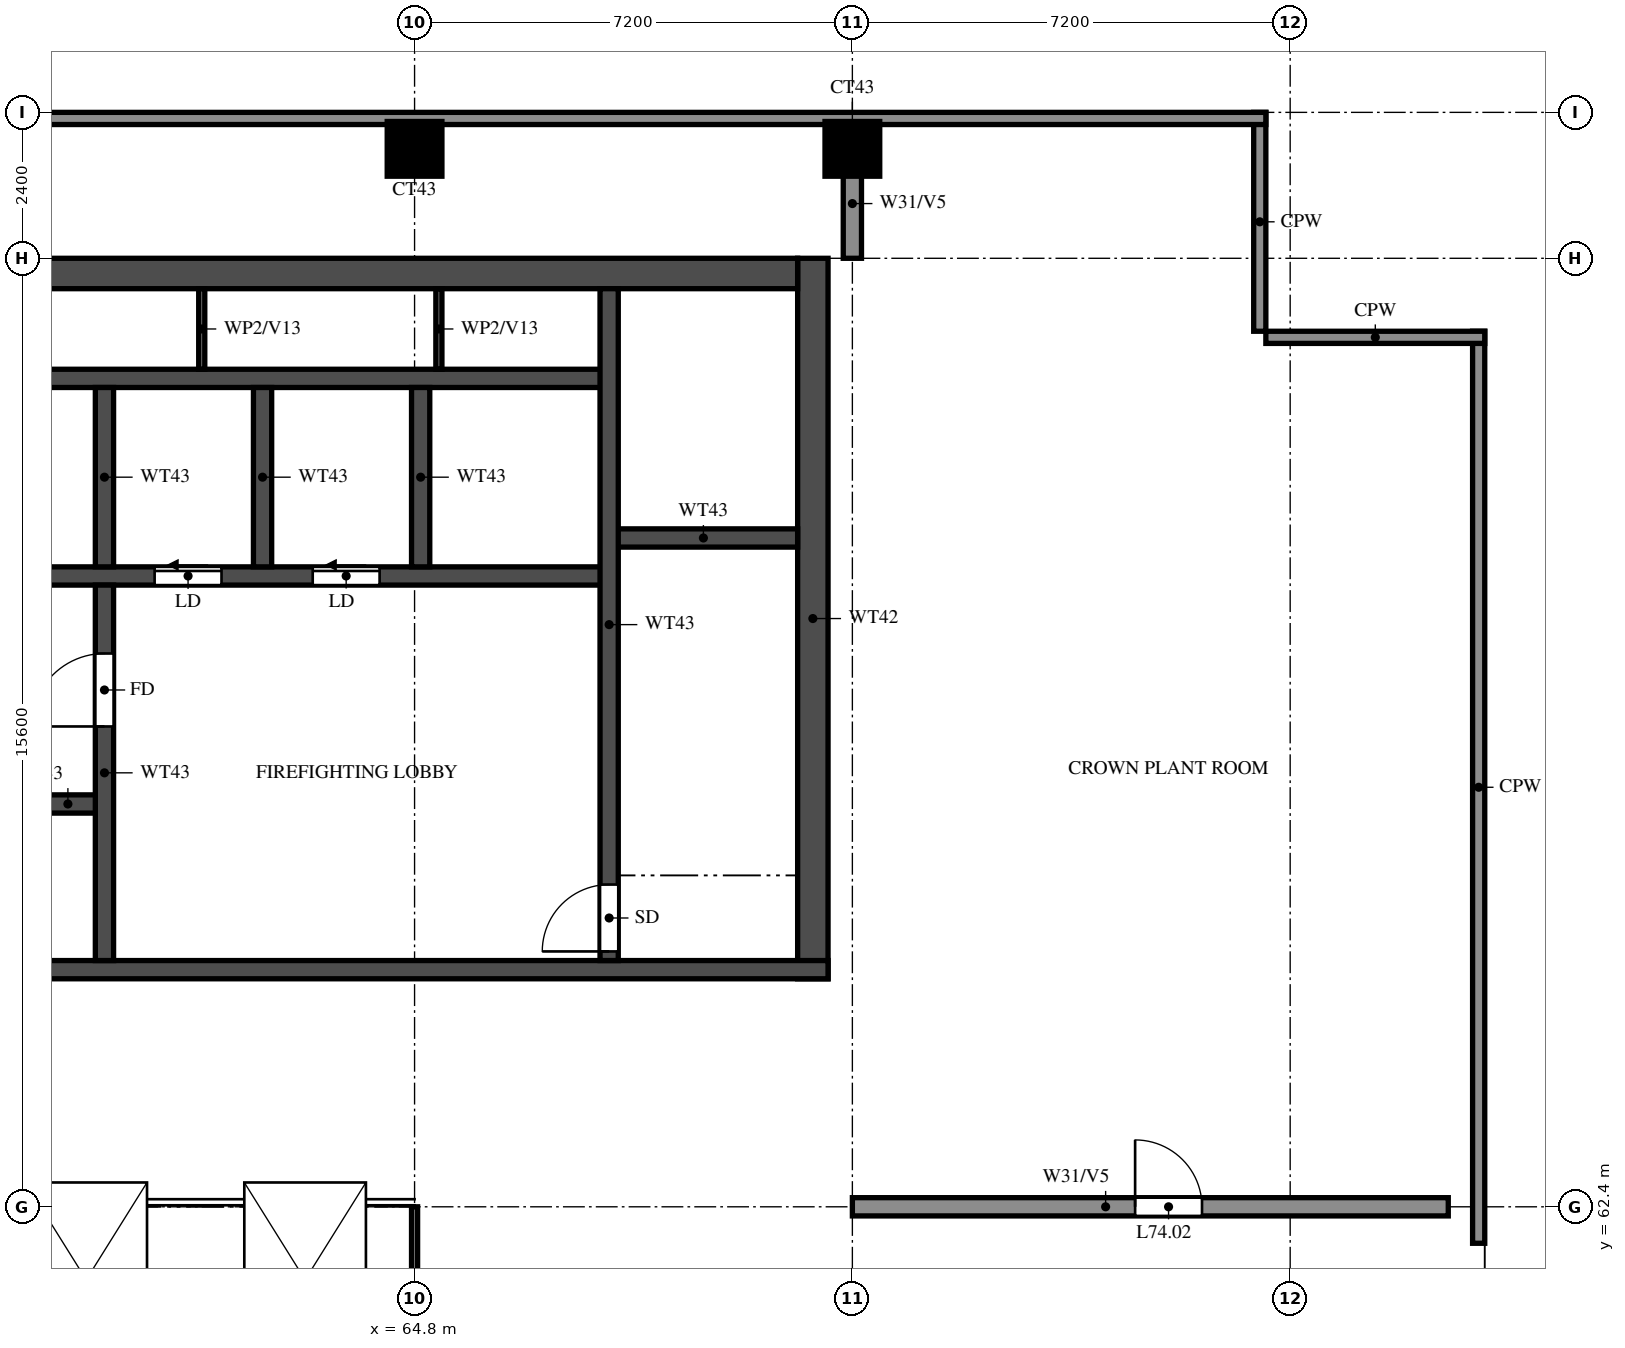
"""IFC4 building model, lengths in metres.
Left out: names, types, materials, properties, quantities, classifications, styles, units other than length and angle.
Written with IfcOpenShell. Run it as: python <this file> out.ifc"""

import sys

from ifc_helpers import new_model, si_unit, direction, frame, frame_2d, origin, origin_2d, place, context, subcontext, project, spatial, rectangle, extrude, source, transform, mapped, element, fill, save


model = new_model("IFC4")
c1 = context("Model", 3, precision=1e-05, world=origin(), true_north=direction((0.0, 1.0)))
c2 = subcontext(c1, "Body", "Model", "MODEL_VIEW")
j1 = project(units=[si_unit("LENGTHUNIT", "METRE"), si_unit("PLANEANGLEUNIT", "RADIAN")], contexts=[c1])
p1 = place(None, origin())
s1 = spatial("IfcSite", under=j1, at=p1, CompositionType="ELEMENT")
p2 = place(p1, origin())
s2 = spatial("IfcBuilding", under=s1, at=p2, CompositionType="ELEMENT")
p3 = place(p2, frame((0.0, 0.0, 274.5)))
s3 = spatial("IfcBuildingStorey", under=s2, at=p3, CompositionType="ELEMENT", Elevation=274.5)
m1 = source(origin(), c2, "Body", "SweptSolid", [
    extrude(rectangle(XDim=0.9, YDim=0.9, at=origin_2d()), origin(), (0.0, 0.0, 1.0), 7.0),
])
for number, where, z_axis, x_axis in (
    (1, (64.8, 79.8, 0.0), (0.0, 0.0, 1.0), (1.0, 0.0, 0.0)),
    (2, (72.0, 79.8, 0.0), (0.0, 0.0, 1.0), (1.0, 0.0, 0.0)),
):
    element("IfcColumn", number, at=place(p3, frame(where, z_axis=z_axis, x_axis=x_axis)), inside=s3, PredefinedType="COLUMN", context=c2, shape_type="MappedRepresentation", body=[
        mapped(m1, transform((0.0, 0.0, 0.0))),
    ])
p4 = place(p3, frame((71.35, 66.15, 0.0), z_axis=(0.0, 0.0, 1.0), x_axis=(0.0, 1.0, 0.0)))
e3 = element("IfcWall", 3, at=p4, inside=s3, PredefinedType="SHEAR", context=c2, shape_type="SweptSolid", body=[
    extrude(rectangle(XDim=11.85, YDim=0.5, at=frame_2d((5.925, 0.0))), origin(), (0.0, 0.0, 1.0), 7.0),
])
p5 = place(p3, frame((29.7, 77.75, 0.0), z_axis=(0.0, 0.0, 1.0), x_axis=(1.0, 0.0, 0.0)))
e4 = element("IfcWall", 4, at=p5, inside=s3, PredefinedType="SHEAR", context=c2, shape_type="SweptSolid", body=[
    extrude(rectangle(XDim=41.4, YDim=0.5, at=frame_2d((20.7, 0.0))), origin(), (0.0, 0.0, 1.0), 7.0),
])
p6 = place(p3, frame((29.2, 66.3, 0.0), z_axis=(0.0, 0.0, 1.0), x_axis=(1.0, 0.0, 0.0)))
e5 = element("IfcWall", 5, at=p6, inside=s3, PredefinedType="SHEAR", context=c2, shape_type="SweptSolid", body=[
    extrude(rectangle(XDim=42.4, YDim=0.3, at=frame_2d((21.2, 0.0))), origin(), (0.0, 0.0, 1.0), 7.0),
])
p7 = place(p6, frame((1.425, 0.0, 0.0)))
e6 = element("IfcOpeningElement", 6, at=p7, cuts=e5, PredefinedType="OPENING", context=c2, shape_type="SweptSolid", body=[
    extrude(rectangle(XDim=1.1, YDim=2.1, at=frame_2d((0.55, 1.05))), frame((0.0, 0.16, 0.0), z_axis=(0.0, -1.0, 0.0), x_axis=(1.0, 0.0, 0.0)), (0.0, 0.0, 1.0), 0.32),
])
p8 = place(p6, frame((4.2, 0.0, 0.0)))
e7 = element("IfcOpeningElement", 7, at=p8, cuts=e5, PredefinedType="OPENING", context=c2, shape_type="SweptSolid", body=[
    extrude(rectangle(XDim=1.8, YDim=2.1, at=frame_2d((0.9, 1.05))), frame((0.0, 0.16, 0.0), z_axis=(0.0, -1.0, 0.0), x_axis=(1.0, 0.0, 0.0)), (0.0, 0.0, 1.0), 0.32),
])
p9 = place(p3, frame((35.65, 69.025, 0.0), z_axis=(0.0, 0.0, 1.0), x_axis=(1.0, 0.0, 0.0)))
e8 = element("IfcWall", 8, at=p9, inside=s3, PredefinedType="SHEAR", context=c2, shape_type="SweptSolid", body=[
    extrude(rectangle(XDim=24.05, YDim=0.3, at=frame_2d((12.025, 0.0))), origin(), (0.0, 0.0, 1.0), 7.0),
])
p10 = place(p9, frame((0.975, 0.0, 0.0)))
e9 = element("IfcOpeningElement", 9, at=p10, cuts=e8, PredefinedType="OPENING", context=c2, shape_type="SweptSolid", body=[
    extrude(rectangle(XDim=1.1, YDim=2.1, at=frame_2d((0.55, 1.05))), frame((0.0, 0.16, 0.0), z_axis=(0.0, -1.0, 0.0), x_axis=(1.0, 0.0, 0.0)), (0.0, 0.0, 1.0), 0.32),
])
p11 = place(p9, frame((3.725, 0.0, 0.0)))
e10 = element("IfcOpeningElement", 10, at=p11, cuts=e8, PredefinedType="OPENING", context=c2, shape_type="SweptSolid", body=[
    extrude(rectangle(XDim=1.1, YDim=2.1, at=frame_2d((0.55, 1.05))), frame((0.0, 0.16, 0.0), z_axis=(0.0, -1.0, 0.0), x_axis=(1.0, 0.0, 0.0)), (0.0, 0.0, 1.0), 0.32),
])
p12 = place(p9, frame((6.475, 0.0, 0.0)))
e11 = element("IfcOpeningElement", 11, at=p12, cuts=e8, PredefinedType="OPENING", context=c2, shape_type="SweptSolid", body=[
    extrude(rectangle(XDim=1.1, YDim=2.1, at=frame_2d((0.55, 1.05))), frame((0.0, 0.16, 0.0), z_axis=(0.0, -1.0, 0.0), x_axis=(1.0, 0.0, 0.0)), (0.0, 0.0, 1.0), 0.32),
])
p13 = place(p9, frame((9.225, 0.0, 0.0)))
e12 = element("IfcOpeningElement", 12, at=p13, cuts=e8, PredefinedType="OPENING", context=c2, shape_type="SweptSolid", body=[
    extrude(rectangle(XDim=1.1, YDim=2.1, at=frame_2d((0.55, 1.05))), frame((0.0, 0.16, 0.0), z_axis=(0.0, -1.0, 0.0), x_axis=(1.0, 0.0, 0.0)), (0.0, 0.0, 1.0), 0.32),
])
p14 = place(p9, frame((11.975, 0.0, 0.0)))
e13 = element("IfcOpeningElement", 13, at=p14, cuts=e8, PredefinedType="OPENING", context=c2, shape_type="SweptSolid", body=[
    extrude(rectangle(XDim=1.1, YDim=2.1, at=frame_2d((0.55, 1.05))), frame((0.0, 0.16, 0.0), z_axis=(0.0, -1.0, 0.0), x_axis=(1.0, 0.0, 0.0)), (0.0, 0.0, 1.0), 0.32),
])
p15 = place(p9, frame((14.725, 0.0, 0.0)))
e14 = element("IfcOpeningElement", 14, at=p15, cuts=e8, PredefinedType="OPENING", context=c2, shape_type="SweptSolid", body=[
    extrude(rectangle(XDim=1.1, YDim=2.1, at=frame_2d((0.55, 1.05))), frame((0.0, 0.16, 0.0), z_axis=(0.0, -1.0, 0.0), x_axis=(1.0, 0.0, 0.0)), (0.0, 0.0, 1.0), 0.32),
])
p16 = place(p9, frame((17.6, 0.0, 0.0)))
e15 = element("IfcOpeningElement", 15, at=p16, cuts=e8, PredefinedType="OPENING", context=c2, shape_type="SweptSolid", body=[
    extrude(rectangle(XDim=1.1, YDim=2.1, at=frame_2d((0.55, 1.05))), frame((0.0, 0.16, 0.0), z_axis=(0.0, -1.0, 0.0), x_axis=(1.0, 0.0, 0.0)), (0.0, 0.0, 1.0), 0.32),
])
p17 = place(p9, frame((20.6, 0.0, 0.0)))
e16 = element("IfcOpeningElement", 16, at=p17, cuts=e8, PredefinedType="OPENING", context=c2, shape_type="SweptSolid", body=[
    extrude(rectangle(XDim=1.1, YDim=2.1, at=frame_2d((0.55, 1.05))), frame((0.0, 0.16, 0.0), z_axis=(0.0, -1.0, 0.0), x_axis=(1.0, 0.0, 0.0)), (0.0, 0.0, 1.0), 0.32),
])
p18 = place(p3, frame((32.8, 72.775, 0.0), z_axis=(0.0, 0.0, 1.0), x_axis=(1.0, 0.0, 0.0)))
e17 = element("IfcWall", 17, at=p18, inside=s3, PredefinedType="SHEAR", context=c2, shape_type="SweptSolid", body=[
    extrude(rectangle(XDim=35.2, YDim=0.3, at=frame_2d((17.6, 0.0))), origin(), (0.0, 0.0, 1.0), 7.0),
])
p19 = place(p18, frame((19.8, 0.0, 0.0)))
e18 = element("IfcOpeningElement", 18, at=p19, cuts=e17, PredefinedType="OPENING", context=c2, shape_type="SweptSolid", body=[
    extrude(rectangle(XDim=1.1, YDim=2.1, at=frame_2d((0.55, 1.05))), frame((0.0, 0.16, 0.0), z_axis=(0.0, -1.0, 0.0), x_axis=(1.0, 0.0, 0.0)), (0.0, 0.0, 1.0), 0.32),
])
p20 = place(p18, frame((27.725, 0.0, 0.0)))
e19 = element("IfcOpeningElement", 19, at=p20, cuts=e17, PredefinedType="OPENING", context=c2, shape_type="SweptSolid", body=[
    extrude(rectangle(XDim=1.1, YDim=2.1, at=frame_2d((0.55, 1.05))), frame((0.0, 0.16, 0.0), z_axis=(0.0, -1.0, 0.0), x_axis=(1.0, 0.0, 0.0)), (0.0, 0.0, 1.0), 0.32),
])
p21 = place(p18, frame((30.325, 0.0, 0.0)))
e20 = element("IfcOpeningElement", 20, at=p21, cuts=e17, PredefinedType="OPENING", context=c2, shape_type="SweptSolid", body=[
    extrude(rectangle(XDim=1.1, YDim=2.1, at=frame_2d((0.55, 1.05))), frame((0.0, 0.16, 0.0), z_axis=(0.0, -1.0, 0.0), x_axis=(1.0, 0.0, 0.0)), (0.0, 0.0, 1.0), 0.32),
])
p22 = place(p18, frame((0.95, 0.0, 0.0)))
e21 = element("IfcOpeningElement", 21, at=p22, cuts=e17, PredefinedType="OPENING", context=c2, shape_type="SweptSolid", body=[
    extrude(rectangle(XDim=1.1, YDim=2.1, at=frame_2d((0.55, 1.05))), frame((0.0, 0.16, 0.0), z_axis=(0.0, -1.0, 0.0), x_axis=(1.0, 0.0, 0.0)), (0.0, 0.0, 1.0), 0.32),
])
p23 = place(p3, frame((32.8, 76.025, 0.0), z_axis=(0.0, 0.0, 1.0), x_axis=(1.0, 0.0, 0.0)))
e22 = element("IfcWall", 22, at=p23, inside=s3, PredefinedType="SHEAR", context=c2, shape_type="SweptSolid", body=[
    extrude(rectangle(XDim=35.2, YDim=0.3, at=frame_2d((17.6, 0.0))), origin(), (0.0, 0.0, 1.0), 7.0),
])
p24 = place(p3, frame((68.0, 73.4, 0.0), z_axis=(0.0, 0.0, 1.0), x_axis=(1.0, 0.0, 0.0)))
e23 = element("IfcWall", 23, at=p24, inside=s3, PredefinedType="SHEAR", context=c2, shape_type="SweptSolid", body=[
    extrude(rectangle(XDim=3.1, YDim=0.3, at=frame_2d((1.55, 0.0))), origin(), (0.0, 0.0, 1.0), 7.0),
])
p25 = place(p3, frame((68.0, 66.45, 0.0), z_axis=(0.0, 0.0, 1.0), x_axis=(0.0, 1.0, 0.0)))
e24 = element("IfcWall", 24, at=p25, inside=s3, PredefinedType="SHEAR", context=c2, shape_type="SweptSolid", body=[
    extrude(rectangle(XDim=11.05, YDim=0.3, at=frame_2d((5.525, 0.0))), origin(), (0.0, 0.0, 1.0), 7.0),
])
p26 = place(p25, frame((0.15, 0.0, 0.0)))
e25 = element("IfcOpeningElement", 25, at=p26, cuts=e24, PredefinedType="OPENING", context=c2, shape_type="SweptSolid", body=[
    extrude(rectangle(XDim=1.1, YDim=2.1, at=frame_2d((0.55, 1.05))), frame((0.0, 0.16, 0.0), z_axis=(0.0, -1.0, 0.0), x_axis=(1.0, 0.0, 0.0)), (0.0, 0.0, 1.0), 0.32),
])
p27 = place(p3, frame((59.7, 66.45, 0.0), z_axis=(0.0, 0.0, 1.0), x_axis=(0.0, 1.0, 0.0)))
e26 = element("IfcWall", 26, at=p27, inside=s3, PredefinedType="SHEAR", context=c2, shape_type="SweptSolid", body=[
    extrude(rectangle(XDim=6.175, YDim=0.3, at=frame_2d((3.087, 0.0))), origin(), (0.0, 0.0, 1.0), 7.0),
])
p28 = place(p27, frame((3.85, 0.0, 0.0)))
e27 = element("IfcOpeningElement", 27, at=p28, cuts=e26, PredefinedType="OPENING", context=c2, shape_type="SweptSolid", body=[
    extrude(rectangle(XDim=1.2, YDim=2.1, at=frame_2d((0.6, 1.05))), frame((0.0, 0.16, 0.0), z_axis=(0.0, -1.0, 0.0), x_axis=(1.0, 0.0, 0.0)), (0.0, 0.0, 1.0), 0.32),
])
for number, where, z_axis, x_axis in (
    (28, (59.7, 72.925, 0.0), (0.0, 0.0, 1.0), (0.0, 1.0, 0.0)),
    (29, (62.3, 72.925, 0.0), (0.0, 0.0, 1.0), (0.0, 1.0, 0.0)),
    (30, (64.9, 72.925, 0.0), (0.0, 0.0, 1.0), (0.0, 1.0, 0.0)),
):
    element("IfcWall", number, at=place(p3, frame(where, z_axis=z_axis, x_axis=x_axis)), inside=s3, PredefinedType="SHEAR", context=c2, shape_type="SweptSolid", body=[
        extrude(rectangle(XDim=2.95, YDim=0.3, at=frame_2d((1.475, 0.0))), origin(), (0.0, 0.0, 1.0), 7.0),
    ])
p29 = place(p3, frame((82.3, 61.8, 0.0), z_axis=(0.0, 0.0, 1.0), x_axis=(0.0, 1.0, 0.0)))
e31 = element("IfcWall", 31, at=p29, inside=s3, PredefinedType="SOLIDWALL", context=c2, shape_type="SweptSolid", body=[
    extrude(rectangle(XDim=15.0, YDim=0.2, at=frame_2d((7.5, 0.0))), origin(), (0.0, 0.0, 1.0), 7.0),
])
for number, where, z_axis, x_axis in (
    (32, (82.4, 76.7, 0.0), (0.0, 0.0, 1.0), (-1.0, 0.0, 0.0)),
    (33, (78.7, 76.8, 0.0), (0.0, 0.0, 1.0), (0.0, 1.0, 0.0)),
):
    element("IfcWall", number, at=place(p3, frame(where, z_axis=z_axis, x_axis=x_axis)), inside=s3, PredefinedType="SOLIDWALL", context=c2, shape_type="SweptSolid", body=[
        extrude(rectangle(XDim=3.6, YDim=0.2, at=frame_2d((1.8, 0.0))), origin(), (0.0, 0.0, 1.0), 7.0),
    ])
p30 = place(p3, frame((78.8, 80.3, 0.0), z_axis=(0.0, 0.0, 1.0), x_axis=(-1.0, 0.0, 0.0)))
e34 = element("IfcWall", 34, at=p30, inside=s3, PredefinedType="SOLIDWALL", context=c2, shape_type="SweptSolid", body=[
    extrude(rectangle(XDim=56.8, YDim=0.2, at=frame_2d((28.4, 0.0))), origin(), (0.0, 0.0, 1.0), 7.0),
])
for number, where, z_axis, x_axis in (
    (35, (61.3, 76.175, 0.0), (0.0, 0.0, 1.0), (0.0, 1.0, 0.0)),
    (36, (65.2, 76.175, 0.0), (0.0, 0.0, 1.0), (0.0, 1.0, 0.0)),
):
    element("IfcWall", number, at=place(p3, frame(where, z_axis=z_axis, x_axis=x_axis)), inside=s3, PredefinedType="PARTITIONING", context=c2, shape_type="SweptSolid", body=[
        extrude(rectangle(XDim=1.325, YDim=0.1, at=frame_2d((0.663, 0.0))), origin(), (0.0, 0.0, 1.0), 7.0),
    ])
p31 = place(p3, frame((72.0, 62.4, 0.0), z_axis=(0.0, 0.0, 1.0), x_axis=(1.0, 0.0, 0.0)))
e37 = element("IfcWall", 37, at=p31, inside=s3, PredefinedType="SOLIDWALL", context=c2, shape_type="SweptSolid", body=[
    extrude(rectangle(XDim=9.8, YDim=0.3, at=frame_2d((4.9, 0.0))), origin(), (0.0, 0.0, 1.0), 7.0),
])
p32 = place(p31, frame((4.65, 0.0, 0.0)))
e38 = element("IfcOpeningElement", 38, at=p32, cuts=e37, PredefinedType="OPENING", context=c2, shape_type="SweptSolid", body=[
    extrude(rectangle(XDim=1.1, YDim=2.1, at=frame_2d((0.55, 1.05))), frame((0.0, 0.16, 0.0), z_axis=(0.0, -1.0, 0.0), x_axis=(1.0, 0.0, 0.0)), (0.0, 0.0, 1.0), 0.32),
])
p33 = place(p3, frame((64.8, 48.0, 0.0), z_axis=(0.0, 0.0, 1.0), x_axis=(0.0, 1.0, 0.0)))
e39 = element("IfcWall", 39, at=p33, inside=s3, PredefinedType="PARTITIONING", context=c2, shape_type="SweptSolid", body=[
    extrude(rectangle(XDim=14.4, YDim=0.1, at=frame_2d((7.2, 0.0))), origin(), (0.0, 0.0, 1.0), 7.0),
])
p34 = place(p3, frame((72.0, 78.0, 0.0), z_axis=(0.0, 0.0, 1.0), x_axis=(0.0, 1.0, 0.0)))
e40 = element("IfcWall", 40, at=p34, inside=s3, PredefinedType="SOLIDWALL", context=c2, shape_type="SweptSolid", body=[
    extrude(rectangle(XDim=1.8, YDim=0.3, at=frame_2d((0.9, 0.0))), origin(), (0.0, 0.0, 1.0), 7.0),
])
p35 = place(p2, frame((0.0, 0.0, 281.5)))
p36 = place(p35, frame((0.0, 0.0, 1.3)))
p37 = place(p36, frame((59.4, 61.2, 0.0)))
p38 = place(p37, frame((0.0, 0.0, 0.15)))
e41 = element("IfcWindow", 41, at=p38, inside=s3, PartitioningType="SINGLE_PANEL", PredefinedType="SKYLIGHT", context=c2, shape_type="SweptSolid", body=[
    extrude(rectangle(XDim=3.2, YDim=2.0, at=origin_2d()), origin(), (0.0, 0.0, 1.0), 0.05),
])
p39 = place(p36, frame((63.0, 61.2, 0.0)))
p40 = place(p39, frame((0.0, 0.0, 0.15)))
e42 = element("IfcWindow", 42, at=p40, inside=s3, PartitioningType="SINGLE_PANEL", PredefinedType="SKYLIGHT", context=c2, shape_type="SweptSolid", body=[
    extrude(rectangle(XDim=3.2, YDim=2.0, at=origin_2d()), origin(), (0.0, 0.0, 1.0), 0.05),
])
p41 = place(p26, origin())
e43 = element("IfcDoor", 43, at=p41, inside=s3, OperationType="SINGLE_SWING_RIGHT", PredefinedType="DOOR", context=c2, shape_type="SweptSolid", body=[
    extrude(rectangle(XDim=1.1, YDim=2.1, at=frame_2d((0.55, 1.05))), frame((0.0, 0.025, 0.0), z_axis=(0.0, -1.0, 0.0), x_axis=(1.0, 0.0, 0.0)), (0.0, 0.0, 1.0), 0.05),
])
fill(e25, e43)
p42 = place(p28, origin())
e44 = element("IfcDoor", 44, at=p42, inside=s3, OperationType="SINGLE_SWING_LEFT", PredefinedType="DOOR", context=c2, shape_type="SweptSolid", body=[
    extrude(rectangle(XDim=1.2, YDim=2.1, at=frame_2d((0.6, 1.05))), frame((0.0, 0.025, 0.0), z_axis=(0.0, -1.0, 0.0), x_axis=(1.0, 0.0, 0.0)), (0.0, 0.0, 1.0), 0.05),
])
fill(e27, e44)
p43 = place(p20, origin())
e45 = element("IfcDoor", 45, at=p43, inside=s3, OperationType="SLIDING_TO_LEFT", PredefinedType="DOOR", context=c2, shape_type="SweptSolid", body=[
    extrude(rectangle(XDim=1.1, YDim=2.1, at=frame_2d((0.55, 1.05))), frame((0.0, 0.025, 0.0), z_axis=(0.0, -1.0, 0.0), x_axis=(1.0, 0.0, 0.0)), (0.0, 0.0, 1.0), 0.05),
])
fill(e19, e45)
p44 = place(p21, origin())
e46 = element("IfcDoor", 46, at=p44, inside=s3, OperationType="SLIDING_TO_LEFT", PredefinedType="DOOR", context=c2, shape_type="SweptSolid", body=[
    extrude(rectangle(XDim=1.1, YDim=2.1, at=frame_2d((0.55, 1.05))), frame((0.0, 0.025, 0.0), z_axis=(0.0, -1.0, 0.0), x_axis=(1.0, 0.0, 0.0)), (0.0, 0.0, 1.0), 0.05),
])
fill(e20, e46)
p45 = place(p32, origin())
e47 = element("IfcDoor", 47, at=p45, inside=s3, OperationType="SINGLE_SWING_RIGHT", PredefinedType="DOOR", context=c2, shape_type="SweptSolid", body=[
    extrude(rectangle(XDim=1.1, YDim=2.1, at=frame_2d((0.55, 1.05))), frame((0.0, 0.025, 0.0), z_axis=(0.0, -1.0, 0.0), x_axis=(1.0, 0.0, 0.0)), (0.0, 0.0, 1.0), 0.05),
])
fill(e38, e47)
save(model, sys.argv[1])
